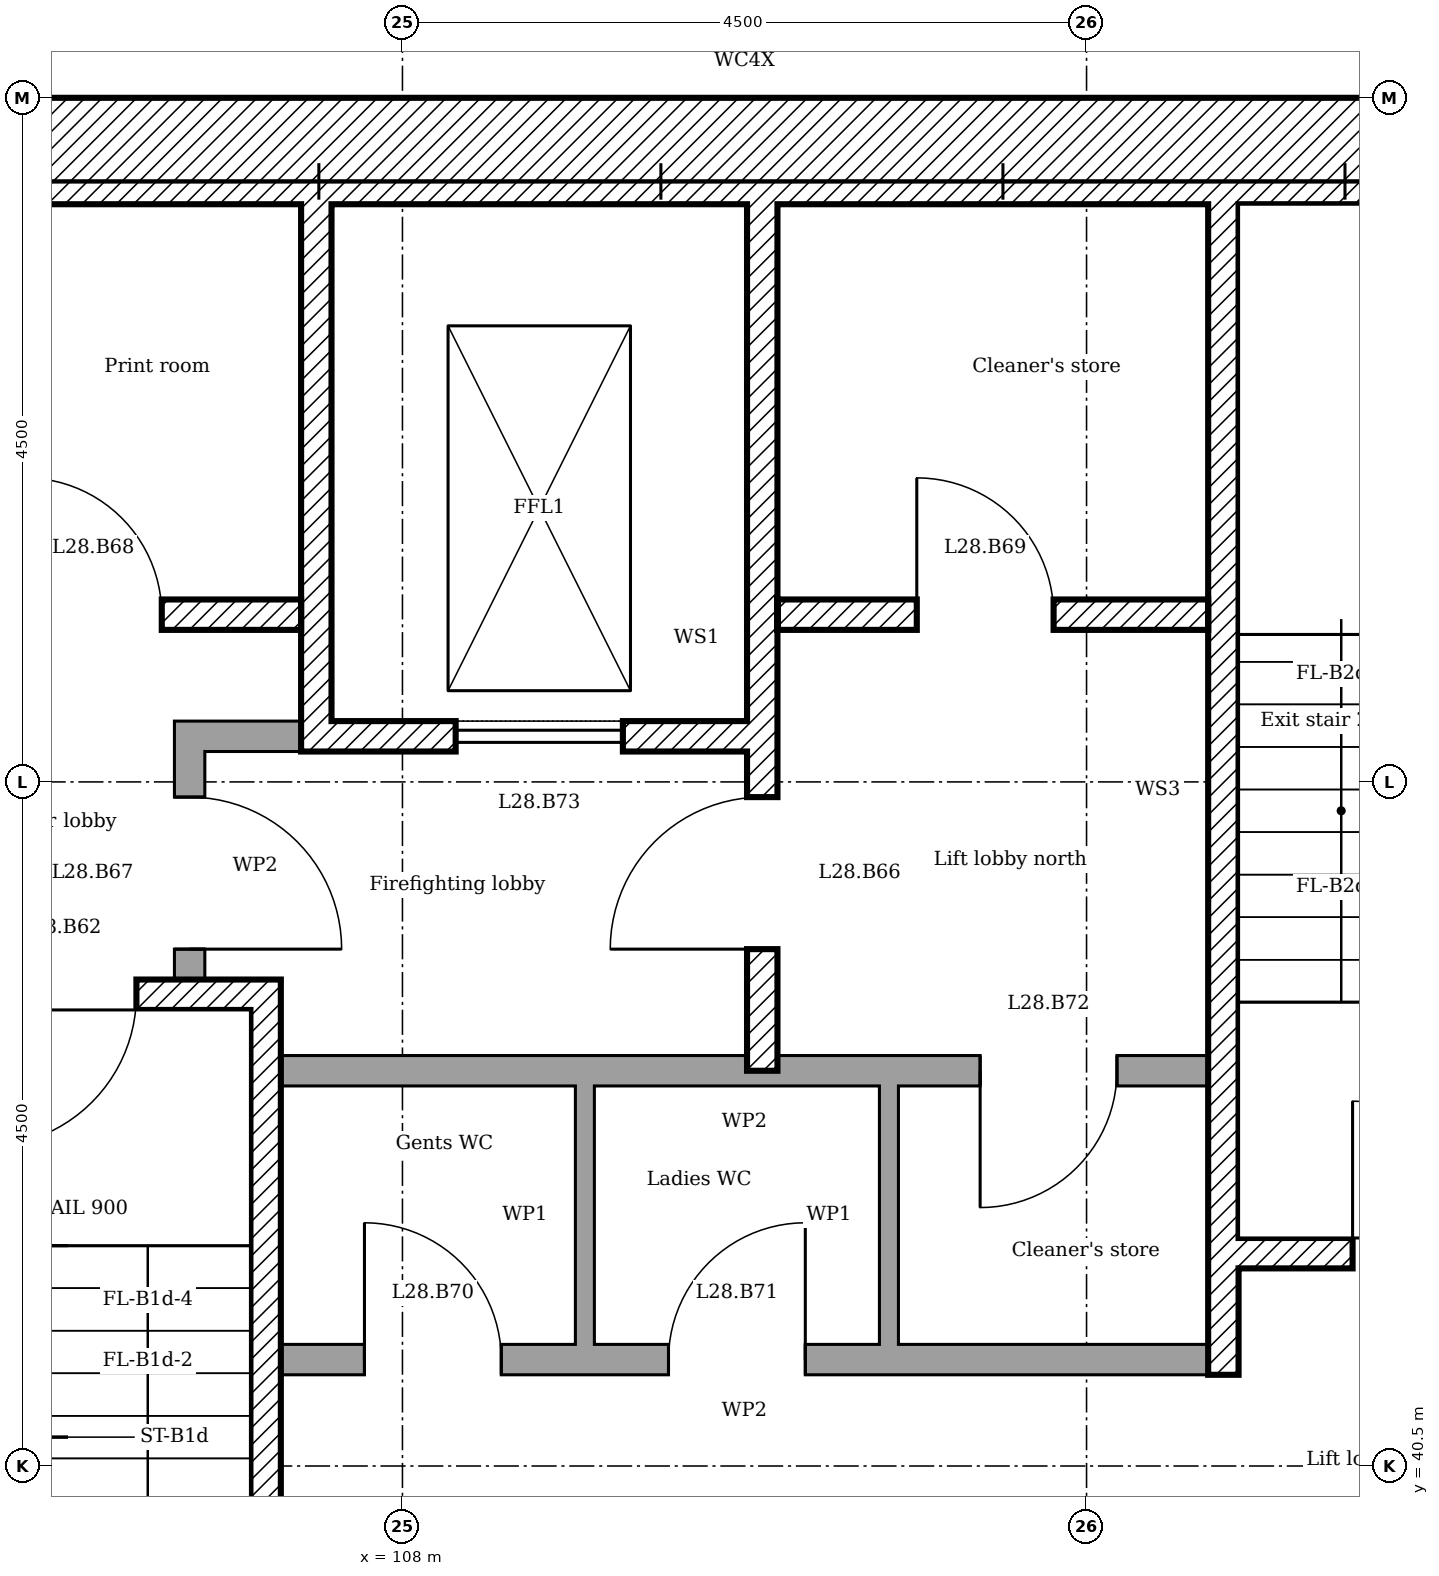
"""IFC4 building model, lengths in metres.
Left out: names, types, materials, properties, quantities, classifications, styles, units other than length and angle.
Written with IfcOpenShell. Run it as: python <this file> out.ifc"""

import sys

from ifc_helpers import new_model, si_unit, direction, frame, frame_2d, origin, place, context, subcontext, project, spatial, rectangle, extrude, element, fill, save


model = new_model("IFC4")
c1 = context("Model", 3, precision=1e-05, world=origin(), true_north=direction((0.0, 1.0)))
c2 = subcontext(c1, "Body", "Model", "MODEL_VIEW")
j1 = project(units=[si_unit("LENGTHUNIT", "METRE"), si_unit("PLANEANGLEUNIT", "RADIAN")], contexts=[c1])
p1 = place(None, origin())
s1 = spatial("IfcSite", under=j1, at=p1, CompositionType="ELEMENT")
p2 = place(p1, origin())
s2 = spatial("IfcBuilding", under=s1, at=p2, CompositionType="ELEMENT")
p3 = place(p2, frame((0.0, 0.0, 113.6)))
s3 = spatial("IfcBuildingStorey", under=s2, at=p3, CompositionType="ELEMENT", Elevation=113.6)
p4 = place(p3, frame((104.2, 49.15, 0.0)))
e1 = element("IfcWall", 1, at=p4, inside=s3, PredefinedType="SHEAR", context=c2, shape_type="SweptSolid", body=[
    extrude(rectangle(XDim=12.1, YDim=0.7, at=frame_2d((6.05, 0.0))), origin(), (0.0, 0.0, 1.0), 6.95),
])
p5 = place(p3, frame((107.433, 48.8, 0.0), z_axis=(0.0, 0.0, 1.0), x_axis=(0.0, -1.0, 0.0)))
e2 = element("IfcWall", 2, at=p5, inside=s3, PredefinedType="SHEAR", context=c2, shape_type="SweptSolid", body=[
    extrude(rectangle(XDim=3.6, YDim=0.2, at=frame_2d((1.8, 0.0))), origin(), (0.0, 0.0, 1.0), 6.95),
])
p6 = place(p3, frame((110.367, 48.8, 0.0), z_axis=(0.0, 0.0, 1.0), x_axis=(0.0, -1.0, 0.0)))
e3 = element("IfcWall", 3, at=p6, inside=s3, PredefinedType="SHEAR", context=c2, shape_type="SweptSolid", body=[
    extrude(rectangle(XDim=5.7, YDim=0.2, at=frame_2d((2.85, 0.0))), origin(), (0.0, 0.0, 1.0), 6.95),
])
p7 = place(p6, frame((3.9, 0.0, 0.0)))
e4 = element("IfcOpeningElement", 4, at=p7, cuts=e3, PredefinedType="OPENING", context=c2, shape_type="SweptSolid", body=[
    extrude(rectangle(XDim=1.0, YDim=2.1, at=frame_2d((0.5, 1.05))), frame((0.0, 0.11, 0.0), z_axis=(0.0, -1.0, 0.0), x_axis=(1.0, 0.0, 0.0)), (0.0, 0.0, 1.0), 0.22),
])
p8 = place(p3, frame((106.5, 45.3, 0.0)))
e5 = element("IfcWall", 5, at=p8, inside=s3, PredefinedType="PARTITIONING", context=c2, shape_type="SweptSolid", body=[
    extrude(rectangle(XDim=0.833, YDim=0.2, at=frame_2d((0.417, 0.0))), origin(), (0.0, 0.0, 1.0), 6.95),
])
p9 = place(p3, frame((106.6, 43.7, 0.0), z_axis=(0.0, 0.0, 1.0), x_axis=(0.0, 1.0, 0.0)))
e6 = element("IfcWall", 6, at=p9, inside=s3, PredefinedType="PARTITIONING", context=c2, shape_type="SweptSolid", body=[
    extrude(rectangle(XDim=1.5, YDim=0.2, at=frame_2d((0.75, 0.0))), origin(), (0.0, 0.0, 1.0), 6.95),
])
p10 = place(p9, frame((0.2, 0.0, 0.0)))
e7 = element("IfcOpeningElement", 7, at=p10, cuts=e6, PredefinedType="OPENING", context=c2, shape_type="SweptSolid", body=[
    extrude(rectangle(XDim=1.0, YDim=2.1, at=frame_2d((0.5, 1.05))), frame((0.0, 0.11, 0.0), z_axis=(0.0, -1.0, 0.0), x_axis=(1.0, 0.0, 0.0)), (0.0, 0.0, 1.0), 0.22),
])
p11 = place(p3, frame((104.2, 46.1, 0.0)))
e8 = element("IfcWall", 8, at=p11, inside=s3, PredefinedType="SHEAR", context=c2, shape_type="SweptSolid", body=[
    extrude(rectangle(XDim=3.133, YDim=0.2, at=frame_2d((1.567, 0.0))), origin(), (0.0, 0.0, 1.0), 6.95),
])
p12 = place(p11, frame((1.317, 0.0, 0.0)))
e9 = element("IfcOpeningElement", 9, at=p12, cuts=e8, PredefinedType="OPENING", context=c2, shape_type="SweptSolid", body=[
    extrude(rectangle(XDim=0.9, YDim=2.1, at=frame_2d((0.45, 1.05))), frame((0.0, 0.11, 0.0), z_axis=(0.0, -1.0, 0.0), x_axis=(1.0, 0.0, 0.0)), (0.0, 0.0, 1.0), 0.22),
])
p13 = place(p3, frame((110.467, 46.1, 0.0)))
e10 = element("IfcWall", 10, at=p13, inside=s3, PredefinedType="SHEAR", context=c2, shape_type="SweptSolid", body=[
    extrude(rectangle(XDim=2.833, YDim=0.2, at=frame_2d((1.417, 0.0))), origin(), (0.0, 0.0, 1.0), 6.95),
])
p14 = place(p13, frame((0.917, 0.0, 0.0)))
e11 = element("IfcOpeningElement", 11, at=p14, cuts=e10, PredefinedType="OPENING", context=c2, shape_type="SweptSolid", body=[
    extrude(rectangle(XDim=0.9, YDim=2.1, at=frame_2d((0.45, 1.05))), frame((0.0, 0.11, 0.0), z_axis=(0.0, -1.0, 0.0), x_axis=(1.0, 0.0, 0.0)), (0.0, 0.0, 1.0), 0.22),
])
p15 = place(p3, frame((107.533, 45.3, 0.0)))
e12 = element("IfcWall", 12, at=p15, inside=s3, PredefinedType="SHEAR", context=c2, shape_type="SweptSolid", body=[
    extrude(rectangle(XDim=2.733, YDim=0.2, at=frame_2d((1.367, 0.0))), origin(), (0.0, 0.0, 1.0), 6.95),
])
p16 = place(p15, frame((0.817, 0.0, 0.0)))
e13 = element("IfcOpeningElement", 13, at=p16, cuts=e12, PredefinedType="OPENING", context=c2, shape_type="SweptSolid", body=[
    extrude(rectangle(XDim=1.1, YDim=2.1, at=frame_2d((0.55, 1.05))), frame((0.0, 0.11, 0.0), z_axis=(0.0, -1.0, 0.0), x_axis=(1.0, 0.0, 0.0)), (0.0, 0.0, 1.0), 0.22),
])
p17 = place(p3, frame((107.1, 36.7, 0.0), z_axis=(0.0, 0.0, 1.0), x_axis=(0.0, 1.0, 0.0)))
e14 = element("IfcWall", 14, at=p17, inside=s3, PredefinedType="SHEAR", context=c2, shape_type="SweptSolid", body=[
    extrude(rectangle(XDim=7.0, YDim=0.2, at=frame_2d((3.5, 0.0))), origin(), (0.0, 0.0, 1.0), 6.95),
])
p18 = place(p3, frame((104.2, 43.6, 0.0)))
e15 = element("IfcWall", 15, at=p18, inside=s3, PredefinedType="SHEAR", context=c2, shape_type="SweptSolid", body=[
    extrude(rectangle(XDim=2.8, YDim=0.2, at=frame_2d((1.4, 0.0))), origin(), (0.0, 0.0, 1.0), 6.95),
])
p19 = place(p18, frame((1.05, 0.0, 0.0)))
e16 = element("IfcOpeningElement", 16, at=p19, cuts=e15, PredefinedType="OPENING", context=c2, shape_type="SweptSolid", body=[
    extrude(rectangle(XDim=1.0, YDim=2.1, at=frame_2d((0.5, 1.05))), frame((0.0, 0.11, 0.0), z_axis=(0.0, -1.0, 0.0), x_axis=(1.0, 0.0, 0.0)), (0.0, 0.0, 1.0), 0.22),
])
p20 = place(p3, frame((113.5, 41.9, 0.0)))
e17 = element("IfcWall", 17, at=p20, inside=s3, PredefinedType="SHEAR", context=c2, shape_type="SweptSolid", body=[
    extrude(rectangle(XDim=2.8, YDim=0.2, at=frame_2d((1.4, 0.0))), origin(), (0.0, 0.0, 1.0), 6.95),
])
p21 = place(p20, frame((0.75, 0.0, 0.0)))
e18 = element("IfcOpeningElement", 18, at=p21, cuts=e17, PredefinedType="OPENING", context=c2, shape_type="SweptSolid", body=[
    extrude(rectangle(XDim=1.0, YDim=2.1, at=frame_2d((0.5, 1.05))), frame((0.0, 0.11, 0.0), z_axis=(0.0, -1.0, 0.0), x_axis=(1.0, 0.0, 0.0)), (0.0, 0.0, 1.0), 0.22),
])
p22 = place(p3, frame((113.4, 41.1, 0.0), z_axis=(0.0, 0.0, 1.0), x_axis=(0.0, 1.0, 0.0)))
e19 = element("IfcWall", 19, at=p22, inside=s3, PredefinedType="SHEAR", context=c2, shape_type="SweptSolid", body=[
    extrude(rectangle(XDim=7.7, YDim=0.2, at=frame_2d((3.85, 0.0))), origin(), (0.0, 0.0, 1.0), 6.95),
])
p23 = place(p3, frame((107.2, 43.1, 0.0)))
e20 = element("IfcWall", 20, at=p23, inside=s3, PredefinedType="PARTITIONING", context=c2, shape_type="SweptSolid", body=[
    extrude(rectangle(XDim=6.1, YDim=0.2, at=frame_2d((3.05, 0.0))), origin(), (0.0, 0.0, 1.0), 6.95),
])
p24 = place(p23, frame((4.6, 0.0, 0.0)))
e21 = element("IfcOpeningElement", 21, at=p24, cuts=e20, PredefinedType="OPENING", context=c2, shape_type="SweptSolid", body=[
    extrude(rectangle(XDim=0.9, YDim=2.1, at=frame_2d((0.45, 1.05))), frame((0.0, 0.11, 0.0), z_axis=(0.0, -1.0, 0.0), x_axis=(1.0, 0.0, 0.0)), (0.0, 0.0, 1.0), 0.22),
])
p25 = place(p3, frame((107.2, 41.2, 0.0)))
e22 = element("IfcWall", 22, at=p25, inside=s3, PredefinedType="PARTITIONING", context=c2, shape_type="SweptSolid", body=[
    extrude(rectangle(XDim=6.1, YDim=0.2, at=frame_2d((3.05, 0.0))), origin(), (0.0, 0.0, 1.0), 6.95),
])
p26 = place(p25, frame((0.55, 0.0, 0.0)))
e23 = element("IfcOpeningElement", 23, at=p26, cuts=e22, PredefinedType="OPENING", context=c2, shape_type="SweptSolid", body=[
    extrude(rectangle(XDim=0.9, YDim=2.1, at=frame_2d((0.45, 1.05))), frame((0.0, 0.11, 0.0), z_axis=(0.0, -1.0, 0.0), x_axis=(1.0, 0.0, 0.0)), (0.0, 0.0, 1.0), 0.22),
])
p27 = place(p25, frame((2.55, 0.0, 0.0)))
e24 = element("IfcOpeningElement", 24, at=p27, cuts=e22, PredefinedType="OPENING", context=c2, shape_type="SweptSolid", body=[
    extrude(rectangle(XDim=0.9, YDim=2.1, at=frame_2d((0.45, 1.05))), frame((0.0, 0.11, 0.0), z_axis=(0.0, -1.0, 0.0), x_axis=(1.0, 0.0, 0.0)), (0.0, 0.0, 1.0), 0.22),
])
for number, where, z_axis, x_axis in (
    (25, (109.2, 41.3, 0.0), (0.0, 0.0, 1.0), (0.0, 1.0, 0.0)),
    (26, (111.2, 41.3, 0.0), (0.0, 0.0, 1.0), (0.0, 1.0, 0.0)),
):
    element("IfcWall", number, at=place(p3, frame(where, z_axis=z_axis, x_axis=x_axis)), inside=s3, PredefinedType="PARTITIONING", context=c2, shape_type="SweptSolid", body=[
        extrude(rectangle(XDim=1.7, YDim=0.125, at=frame_2d((0.85, 0.0))), origin(), (0.0, 0.0, 1.0), 6.95),
    ])
p28 = place(p19, frame((1.0, 0.0, 0.0), x_axis=(-1.0, 0.0, 0.0)))
e27 = element("IfcDoor", 27, at=p28, inside=s3, OperationType="SINGLE_SWING_LEFT", PredefinedType="DOOR", context=c2, shape_type="SweptSolid", body=[
    extrude(rectangle(XDim=1.0, YDim=2.1, at=frame_2d((0.5, 1.05))), frame((0.0, 0.025, 0.0), z_axis=(0.0, -1.0, 0.0), x_axis=(1.0, 0.0, 0.0)), (0.0, 0.0, 1.0), 0.05),
])
fill(e16, e27)
p29 = place(p21, origin())
e28 = element("IfcDoor", 28, at=p29, inside=s3, OperationType="SINGLE_SWING_RIGHT", PredefinedType="DOOR", context=c2, shape_type="SweptSolid", body=[
    extrude(rectangle(XDim=1.0, YDim=2.1, at=frame_2d((0.5, 1.05))), frame((0.0, 0.025, 0.0), z_axis=(0.0, -1.0, 0.0), x_axis=(1.0, 0.0, 0.0)), (0.0, 0.0, 1.0), 0.05),
])
fill(e18, e28)
p30 = place(p7, frame((1.0, 0.0, 0.0), x_axis=(-1.0, 0.0, 0.0)))
e29 = element("IfcDoor", 29, at=p30, inside=s3, OperationType="SINGLE_SWING_RIGHT", PredefinedType="DOOR", context=c2, shape_type="SweptSolid", body=[
    extrude(rectangle(XDim=1.0, YDim=2.1, at=frame_2d((0.5, 1.05))), frame((0.0, 0.025, 0.0), z_axis=(0.0, -1.0, 0.0), x_axis=(1.0, 0.0, 0.0)), (0.0, 0.0, 1.0), 0.05),
])
fill(e4, e29)
p31 = place(p10, frame((1.0, 0.0, 0.0), x_axis=(-1.0, 0.0, 0.0)))
e30 = element("IfcDoor", 30, at=p31, inside=s3, OperationType="SINGLE_SWING_LEFT", PredefinedType="DOOR", context=c2, shape_type="SweptSolid", body=[
    extrude(rectangle(XDim=1.0, YDim=2.1, at=frame_2d((0.5, 1.05))), frame((0.0, 0.025, 0.0), z_axis=(0.0, -1.0, 0.0), x_axis=(1.0, 0.0, 0.0)), (0.0, 0.0, 1.0), 0.05),
])
fill(e7, e30)
p32 = place(p12, origin())
e31 = element("IfcDoor", 31, at=p32, inside=s3, OperationType="SINGLE_SWING_RIGHT", PredefinedType="DOOR", context=c2, shape_type="SweptSolid", body=[
    extrude(rectangle(XDim=0.9, YDim=2.1, at=frame_2d((0.45, 1.05))), frame((0.0, 0.025, 0.0), z_axis=(0.0, -1.0, 0.0), x_axis=(1.0, 0.0, 0.0)), (0.0, 0.0, 1.0), 0.05),
])
fill(e9, e31)
p33 = place(p14, origin())
e32 = element("IfcDoor", 32, at=p33, inside=s3, OperationType="SINGLE_SWING_RIGHT", PredefinedType="DOOR", context=c2, shape_type="SweptSolid", body=[
    extrude(rectangle(XDim=0.9, YDim=2.1, at=frame_2d((0.45, 1.05))), frame((0.0, 0.025, 0.0), z_axis=(0.0, -1.0, 0.0), x_axis=(1.0, 0.0, 0.0)), (0.0, 0.0, 1.0), 0.05),
])
fill(e11, e32)
p34 = place(p26, origin())
e33 = element("IfcDoor", 33, at=p34, inside=s3, OperationType="SINGLE_SWING_RIGHT", PredefinedType="DOOR", context=c2, shape_type="SweptSolid", body=[
    extrude(rectangle(XDim=0.9, YDim=2.1, at=frame_2d((0.45, 1.05))), frame((0.0, 0.025, 0.0), z_axis=(0.0, -1.0, 0.0), x_axis=(1.0, 0.0, 0.0)), (0.0, 0.0, 1.0), 0.05),
])
fill(e23, e33)
p35 = place(p27, origin())
e34 = element("IfcDoor", 34, at=p35, inside=s3, OperationType="SINGLE_SWING_LEFT", PredefinedType="DOOR", context=c2, shape_type="SweptSolid", body=[
    extrude(rectangle(XDim=0.9, YDim=2.1, at=frame_2d((0.45, 1.05))), frame((0.0, 0.025, 0.0), z_axis=(0.0, -1.0, 0.0), x_axis=(1.0, 0.0, 0.0)), (0.0, 0.0, 1.0), 0.05),
])
fill(e24, e34)
p36 = place(p24, frame((0.9, 0.0, 0.0), x_axis=(-1.0, 0.0, 0.0)))
e35 = element("IfcDoor", 35, at=p36, inside=s3, OperationType="SINGLE_SWING_LEFT", PredefinedType="DOOR", context=c2, shape_type="SweptSolid", body=[
    extrude(rectangle(XDim=0.9, YDim=2.1, at=frame_2d((0.45, 1.05))), frame((0.0, 0.025, 0.0), z_axis=(0.0, -1.0, 0.0), x_axis=(1.0, 0.0, 0.0)), (0.0, 0.0, 1.0), 0.05),
])
fill(e21, e35)
p37 = place(p16, origin())
e36 = element("IfcDoor", 36, at=p37, inside=s3, OperationType="SLIDING_TO_LEFT", PredefinedType="DOOR", context=c2, shape_type="SweptSolid", body=[
    extrude(rectangle(XDim=1.1, YDim=2.1, at=frame_2d((0.55, 1.05))), frame((0.0, 0.025, 0.0), z_axis=(0.0, -1.0, 0.0), x_axis=(1.0, 0.0, 0.0)), (0.0, 0.0, 1.0), 0.05),
])
fill(e13, e36)
save(model, sys.argv[1])
